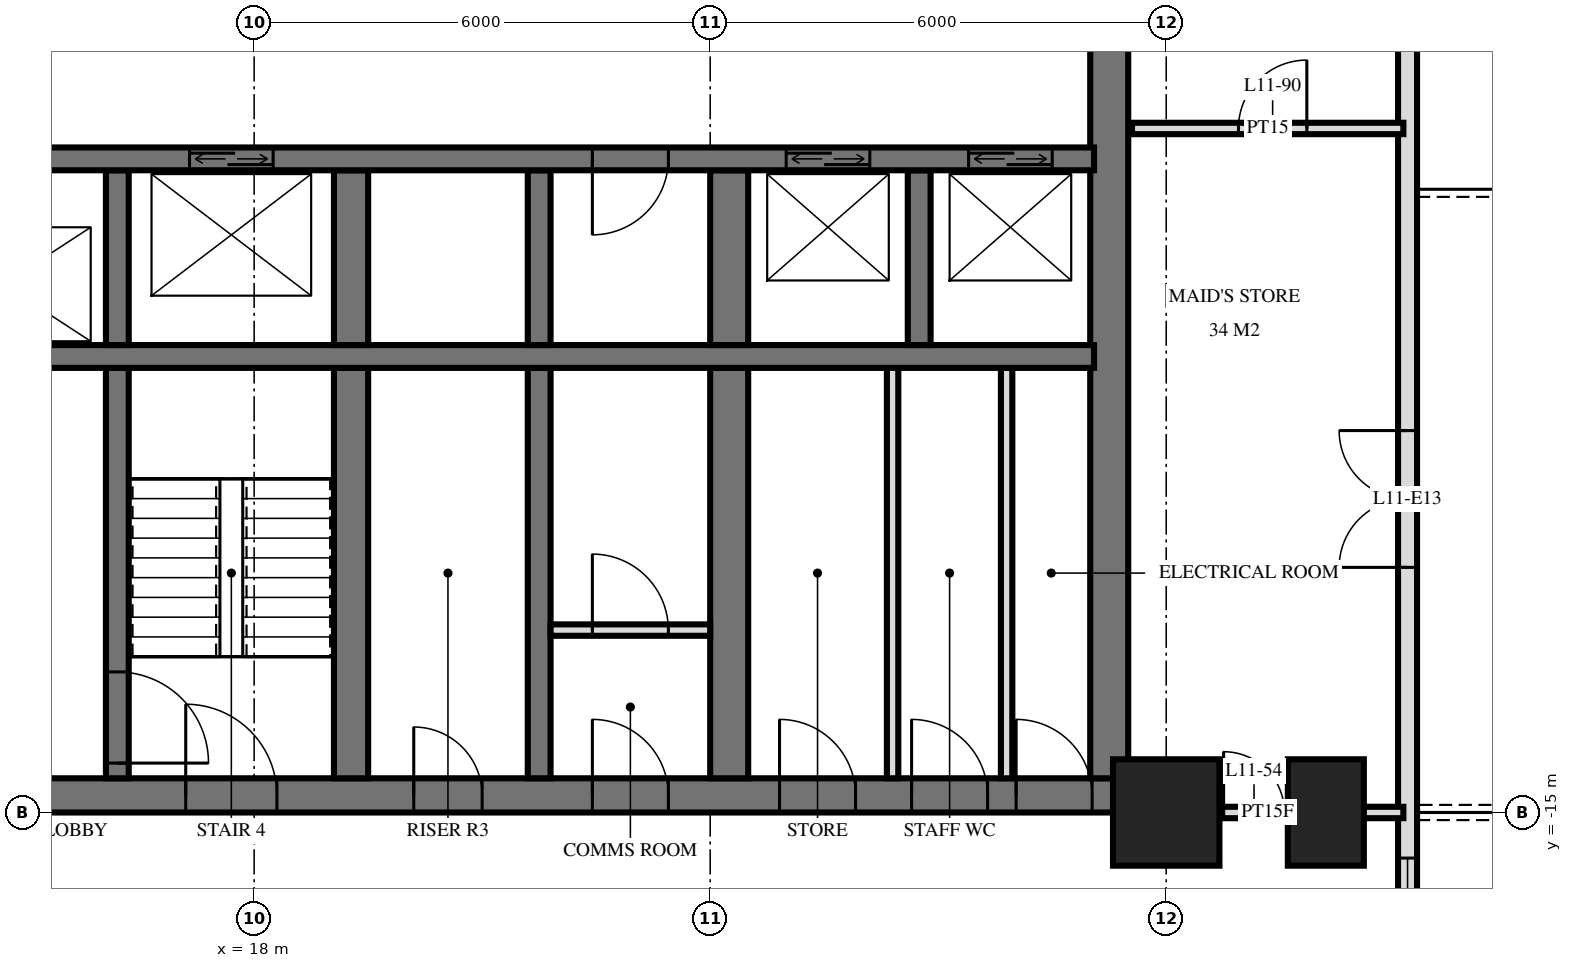
"""IFC4 building model, lengths in metres.
Left out: names, types, materials, properties, quantities, classifications, styles, units other than length and angle.
Written with IfcOpenShell. Run it as: python <this file> out.ifc"""

import sys

from ifc_helpers import new_model, si_unit, direction, frame, frame_2d, origin, origin_2d, place, context, subcontext, project, spatial, rectangle, extrude, element, fill, save


model = new_model("IFC4")
c1 = context("Model", 3, precision=1e-05, world=origin(), true_north=direction((0.0, 1.0)))
c2 = subcontext(c1, "Body", "Model", "MODEL_VIEW")
j1 = project(units=[si_unit("LENGTHUNIT", "METRE"), si_unit("PLANEANGLEUNIT", "RADIAN")], contexts=[c1])
p1 = place(None, origin())
s1 = spatial("IfcSite", under=j1, at=p1, CompositionType="ELEMENT")
p2 = place(p1, origin())
s2 = spatial("IfcBuilding", under=s1, at=p2, CompositionType="ELEMENT")
p3 = place(p2, frame((0.0, 0.0, 49.2)))
s3 = spatial("IfcBuildingStorey", under=s2, at=p3, CompositionType="ELEMENT", Elevation=49.2)
p4 = place(p3, frame((30.0, -15.0, 0.0), z_axis=(0.0, 0.0, 1.0), x_axis=(1.0, 0.0, 0.0)))
e1 = element("IfcColumn", 1, at=p4, inside=s3, PredefinedType="COLUMN", context=c2, shape_type="SweptSolid", body=[
    extrude(rectangle(XDim=1.4, YDim=1.4, at=origin_2d()), origin(), (0.0, 0.0, 1.0), 3.6),
])
p5 = place(p3, frame((32.1, -15.0, 0.0), z_axis=(0.0, 0.0, 1.0), x_axis=(0.0, 1.0, 0.0)))
e2 = element("IfcColumn", 2, at=p5, inside=s3, PredefinedType="COLUMN", context=c2, shape_type="SweptSolid", body=[
    extrude(rectangle(XDim=1.4, YDim=1.0, at=origin_2d()), origin(), (0.0, 0.0, 1.0), 3.6),
])
p6 = place(p3, frame((10.0, -14.775, 0.0), z_axis=(0.0, 0.0, 1.0), x_axis=(1.0, 0.0, 0.0)))
e3 = element("IfcWall", 3, at=p6, inside=s3, PredefinedType="SHEAR", context=c2, shape_type="SweptSolid", body=[
    extrude(rectangle(XDim=19.5, YDim=0.45, at=frame_2d((9.75, 0.0))), origin(), (0.0, 0.0, 1.0), 3.6),
])
p7 = place(p6, frame((7.1, 0.0, 0.0)))
e4 = element("IfcOpeningElement", 4, at=p7, cuts=e3, PredefinedType="OPENING", context=c2, shape_type="SweptSolid", body=[
    extrude(rectangle(XDim=1.2, YDim=2.1, at=frame_2d((0.6, 1.05))), frame((0.0, 0.235, 0.0), z_axis=(0.0, -1.0, 0.0), x_axis=(1.0, 0.0, 0.0)), (0.0, 0.0, 1.0), 0.47),
])
p8 = place(p6, frame((4.15, 0.0, 0.0)))
e5 = element("IfcOpeningElement", 5, at=p8, cuts=e3, PredefinedType="OPENING", context=c2, shape_type="SweptSolid", body=[
    extrude(rectangle(XDim=1.1, YDim=2.1, at=frame_2d((0.55, 1.05))), frame((0.0, 0.235, 0.0), z_axis=(0.0, -1.0, 0.0), x_axis=(1.0, 0.0, 0.0)), (0.0, 0.0, 1.0), 0.47),
])
p9 = place(p6, frame((10.1, 0.0, 0.0)))
e6 = element("IfcOpeningElement", 6, at=p9, cuts=e3, PredefinedType="OPENING", context=c2, shape_type="SweptSolid", body=[
    extrude(rectangle(XDim=0.9, YDim=2.1, at=frame_2d((0.45, 1.05))), frame((0.0, 0.235, 0.0), z_axis=(0.0, -1.0, 0.0), x_axis=(1.0, 0.0, 0.0)), (0.0, 0.0, 1.0), 0.47),
])
p10 = place(p6, frame((12.45, 0.0, 0.0)))
e7 = element("IfcOpeningElement", 7, at=p10, cuts=e3, PredefinedType="OPENING", context=c2, shape_type="SweptSolid", body=[
    extrude(rectangle(XDim=1.0, YDim=2.1, at=frame_2d((0.5, 1.05))), frame((0.0, 0.235, 0.0), z_axis=(0.0, -1.0, 0.0), x_axis=(1.0, 0.0, 0.0)), (0.0, 0.0, 1.0), 0.47),
])
p11 = place(p6, frame((14.913, 0.0, 0.0)))
e8 = element("IfcOpeningElement", 8, at=p11, cuts=e3, PredefinedType="OPENING", context=c2, shape_type="SweptSolid", body=[
    extrude(rectangle(XDim=1.0, YDim=2.1, at=frame_2d((0.5, 1.05))), frame((0.0, 0.235, 0.0), z_axis=(0.0, -1.0, 0.0), x_axis=(1.0, 0.0, 0.0)), (0.0, 0.0, 1.0), 0.47),
])
p12 = place(p6, frame((16.65, 0.0, 0.0)))
e9 = element("IfcOpeningElement", 9, at=p12, cuts=e3, PredefinedType="OPENING", context=c2, shape_type="SweptSolid", body=[
    extrude(rectangle(XDim=1.0, YDim=2.1, at=frame_2d((0.5, 1.05))), frame((0.0, 0.235, 0.0), z_axis=(0.0, -1.0, 0.0), x_axis=(1.0, 0.0, 0.0)), (0.0, 0.0, 1.0), 0.47),
])
p13 = place(p6, frame((18.025, 0.0, 0.0)))
e10 = element("IfcOpeningElement", 10, at=p13, cuts=e3, PredefinedType="OPENING", context=c2, shape_type="SweptSolid", body=[
    extrude(rectangle(XDim=1.0, YDim=2.1, at=frame_2d((0.5, 1.05))), frame((0.0, 0.235, 0.0), z_axis=(0.0, -1.0, 0.0), x_axis=(1.0, 0.0, 0.0)), (0.0, 0.0, 1.0), 0.47),
])
p14 = place(p3, frame((29.25, -14.55, 0.0), z_axis=(0.0, 0.0, 1.0), x_axis=(0.0, 1.0, 0.0)))
e11 = element("IfcWall", 11, at=p14, inside=s3, PredefinedType="SHEAR", context=c2, shape_type="SweptSolid", body=[
    extrude(rectangle(XDim=14.1, YDim=0.5, at=frame_2d((7.05, 0.0))), origin(), (0.0, 0.0, 1.0), 3.6),
])
p15 = place(p3, frame((10.35, -6.4, 0.0), z_axis=(0.0, 0.0, 1.0), x_axis=(1.0, 0.0, 0.0)))
e12 = element("IfcWall", 12, at=p15, inside=s3, PredefinedType="SHEAR", context=c2, shape_type="SweptSolid", body=[
    extrude(rectangle(XDim=18.7, YDim=0.3, at=frame_2d((9.35, 0.0))), origin(), (0.0, 0.0, 1.0), 3.6),
])
p16 = place(p15, frame((14.65, 0.0, 0.0)))
e13 = element("IfcOpeningElement", 13, at=p16, cuts=e12, PredefinedType="OPENING", context=c2, shape_type="SweptSolid", body=[
    extrude(rectangle(XDim=1.1, YDim=2.1, at=frame_2d((0.55, 1.05))), frame((0.0, 0.16, 0.0), z_axis=(0.0, -1.0, 0.0), x_axis=(1.0, 0.0, 0.0)), (0.0, 0.0, 1.0), 0.32),
])
p17 = place(p15, frame((17.05, 0.0, 0.0)))
e14 = element("IfcOpeningElement", 14, at=p17, cuts=e12, PredefinedType="OPENING", context=c2, shape_type="SweptSolid", body=[
    extrude(rectangle(XDim=1.1, YDim=2.1, at=frame_2d((0.55, 1.05))), frame((0.0, 0.16, 0.0), z_axis=(0.0, -1.0, 0.0), x_axis=(1.0, 0.0, 0.0)), (0.0, 0.0, 1.0), 0.32),
])
p18 = place(p15, frame((6.8, 0.0, 0.0)))
e15 = element("IfcOpeningElement", 15, at=p18, cuts=e12, PredefinedType="OPENING", context=c2, shape_type="SweptSolid", body=[
    extrude(rectangle(XDim=1.1, YDim=2.1, at=frame_2d((0.55, 1.05))), frame((0.0, 0.16, 0.0), z_axis=(0.0, -1.0, 0.0), x_axis=(1.0, 0.0, 0.0)), (0.0, 0.0, 1.0), 0.32),
])
p19 = place(p15, frame((12.1, 0.0, 0.0)))
e16 = element("IfcOpeningElement", 16, at=p19, cuts=e12, PredefinedType="OPENING", context=c2, shape_type="SweptSolid", body=[
    extrude(rectangle(XDim=1.0, YDim=2.1, at=frame_2d((0.5, 1.05))), frame((0.0, 0.16, 0.0), z_axis=(0.0, -1.0, 0.0), x_axis=(1.0, 0.0, 0.0)), (0.0, 0.0, 1.0), 0.32),
])
p20 = place(p3, frame((10.35, -9.0, 0.0), z_axis=(0.0, 0.0, 1.0), x_axis=(1.0, 0.0, 0.0)))
e17 = element("IfcWall", 17, at=p20, inside=s3, PredefinedType="SHEAR", context=c2, shape_type="SweptSolid", body=[
    extrude(rectangle(XDim=18.7, YDim=0.3, at=frame_2d((9.35, 0.0))), origin(), (0.0, 0.0, 1.0), 3.6),
])
p21 = place(p20, frame((3.8, 0.0, 0.0)))
e18 = element("IfcOpeningElement", 18, at=p21, cuts=e17, PredefinedType="OPENING", context=c2, shape_type="SweptSolid", body=[
    extrude(rectangle(XDim=1.1, YDim=2.1, at=frame_2d((0.55, 1.05))), frame((0.0, 0.16, 0.0), z_axis=(0.0, -1.0, 0.0), x_axis=(1.0, 0.0, 0.0)), (0.0, 0.0, 1.0), 0.32),
])
p22 = place(p3, frame((16.2, -8.85, 0.0), z_axis=(0.0, 0.0, 1.0), x_axis=(0.0, 1.0, 0.0)))
e19 = element("IfcWall", 19, at=p22, inside=s3, PredefinedType="SHEAR", context=c2, shape_type="SweptSolid", body=[
    extrude(rectangle(XDim=2.3, YDim=0.3, at=frame_2d((1.15, 0.0))), origin(), (0.0, 0.0, 1.0), 3.6),
])
p23 = place(p3, frame((16.2, -14.55, 0.0), z_axis=(0.0, 0.0, 1.0), x_axis=(0.0, 1.0, 0.0)))
e20 = element("IfcWall", 20, at=p23, inside=s3, PredefinedType="SHEAR", context=c2, shape_type="SweptSolid", body=[
    extrude(rectangle(XDim=5.4, YDim=0.3, at=frame_2d((2.7, 0.0))), origin(), (0.0, 0.0, 1.0), 3.6),
])
p24 = place(p23, frame((0.2, 0.0, 0.0)))
e21 = element("IfcOpeningElement", 21, at=p24, cuts=e20, PredefinedType="OPENING", context=c2, shape_type="SweptSolid", body=[
    extrude(rectangle(XDim=1.2, YDim=2.1, at=frame_2d((0.6, 1.05))), frame((0.0, 0.16, 0.0), z_axis=(0.0, -1.0, 0.0), x_axis=(1.0, 0.0, 0.0)), (0.0, 0.0, 1.0), 0.32),
])
p25 = place(p3, frame((19.275, -8.85, 0.0), z_axis=(0.0, 0.0, 1.0), x_axis=(0.0, 1.0, 0.0)))
e22 = element("IfcWall", 22, at=p25, inside=s3, PredefinedType="SHEAR", context=c2, shape_type="SweptSolid", body=[
    extrude(rectangle(XDim=2.3, YDim=0.45, at=frame_2d((1.15, 0.0))), origin(), (0.0, 0.0, 1.0), 3.6),
])
p26 = place(p3, frame((19.275, -14.55, 0.0), z_axis=(0.0, 0.0, 1.0), x_axis=(0.0, 1.0, 0.0)))
e23 = element("IfcWall", 23, at=p26, inside=s3, PredefinedType="SHEAR", context=c2, shape_type="SweptSolid", body=[
    extrude(rectangle(XDim=5.4, YDim=0.45, at=frame_2d((2.7, 0.0))), origin(), (0.0, 0.0, 1.0), 3.6),
])
p27 = place(p3, frame((21.75, -8.85, 0.0), z_axis=(0.0, 0.0, 1.0), x_axis=(0.0, 1.0, 0.0)))
e24 = element("IfcWall", 24, at=p27, inside=s3, PredefinedType="SHEAR", context=c2, shape_type="SweptSolid", body=[
    extrude(rectangle(XDim=2.3, YDim=0.3, at=frame_2d((1.15, 0.0))), origin(), (0.0, 0.0, 1.0), 3.6),
])
p28 = place(p3, frame((21.75, -14.55, 0.0), z_axis=(0.0, 0.0, 1.0), x_axis=(0.0, 1.0, 0.0)))
e25 = element("IfcWall", 25, at=p28, inside=s3, PredefinedType="SHEAR", context=c2, shape_type="SweptSolid", body=[
    extrude(rectangle(XDim=5.4, YDim=0.3, at=frame_2d((2.7, 0.0))), origin(), (0.0, 0.0, 1.0), 3.6),
])
p29 = place(p3, frame((24.25, -8.85, 0.0), z_axis=(0.0, 0.0, 1.0), x_axis=(0.0, 1.0, 0.0)))
e26 = element("IfcWall", 26, at=p29, inside=s3, PredefinedType="SHEAR", context=c2, shape_type="SweptSolid", body=[
    extrude(rectangle(XDim=2.3, YDim=0.5, at=frame_2d((1.15, 0.0))), origin(), (0.0, 0.0, 1.0), 3.6),
])
p30 = place(p3, frame((24.25, -14.55, 0.0), z_axis=(0.0, 0.0, 1.0), x_axis=(0.0, 1.0, 0.0)))
e27 = element("IfcWall", 27, at=p30, inside=s3, PredefinedType="SHEAR", context=c2, shape_type="SweptSolid", body=[
    extrude(rectangle(XDim=5.4, YDim=0.5, at=frame_2d((2.7, 0.0))), origin(), (0.0, 0.0, 1.0), 3.6),
])
p31 = place(p3, frame((26.75, -8.85, 0.0), z_axis=(0.0, 0.0, 1.0), x_axis=(0.0, 1.0, 0.0)))
e28 = element("IfcWall", 28, at=p31, inside=s3, PredefinedType="SHEAR", context=c2, shape_type="SweptSolid", body=[
    extrude(rectangle(XDim=2.3, YDim=0.3, at=frame_2d((1.15, 0.0))), origin(), (0.0, 0.0, 1.0), 3.6),
])
p32 = place(p3, frame((33.175, -24.875, 0.0), z_axis=(0.0, 0.0, 1.0), x_axis=(0.0, 1.0, 0.0)))
e29 = element("IfcWall", 29, at=p32, inside=s3, PredefinedType="SOLIDWALL", context=c2, shape_type="SweptSolid", body=[
    extrude(rectangle(XDim=21.551, YDim=0.25, at=frame_2d((10.775, 0.0))), origin(), (0.0, 0.0, 1.0), 3.32),
])
p33 = place(p32, frame((0.575, 0.0, 0.0)))
e30 = element("IfcOpeningElement", 30, at=p33, cuts=e29, PredefinedType="OPENING", context=c2, shape_type="SweptSolid", body=[
    extrude(rectangle(XDim=1.8, YDim=2.4, at=frame_2d((0.9, 1.2))), frame((0.0, 0.135, 0.0), z_axis=(0.0, -1.0, 0.0), x_axis=(1.0, 0.0, 0.0)), (0.0, 0.0, 1.0), 0.27),
])
p34 = place(p32, frame((5.075, 0.0, 0.0)))
e31 = element("IfcOpeningElement", 31, at=p34, cuts=e29, PredefinedType="OPENING", context=c2, shape_type="SweptSolid", body=[
    extrude(rectangle(XDim=1.8, YDim=2.4, at=frame_2d((0.9, 1.2))), frame((0.0, 0.135, 0.0), z_axis=(0.0, -1.0, 0.0), x_axis=(1.0, 0.0, 0.0)), (0.0, 0.0, 1.0), 0.27),
])
p35 = place(p32, frame((8.075, 0.0, 0.3)))
e32 = element("IfcOpeningElement", 32, at=p35, cuts=e29, PredefinedType="OPENING", context=c2, shape_type="SweptSolid", body=[
    extrude(rectangle(XDim=1.2, YDim=2.1, at=frame_2d((0.6, 1.05))), frame((0.0, 0.135, 0.0), z_axis=(0.0, -1.0, 0.0), x_axis=(1.0, 0.0, 0.0)), (0.0, 0.0, 1.0), 0.27),
])
p36 = place(p32, frame((13.1, 0.0, 0.0)))
e33 = element("IfcOpeningElement", 33, at=p36, cuts=e29, PredefinedType="OPENING", context=c2, shape_type="SweptSolid", body=[
    extrude(rectangle(XDim=1.8, YDim=2.4, at=frame_2d((0.9, 1.2))), frame((0.0, 0.135, 0.0), z_axis=(0.0, -1.0, 0.0), x_axis=(1.0, 0.0, 0.0)), (0.0, 0.0, 1.0), 0.27),
])
p37 = place(p3, frame((21.9, -12.6, 0.0), z_axis=(0.0, 0.0, 1.0), x_axis=(1.0, 0.0, 0.0)))
e34 = element("IfcWall", 34, at=p37, inside=s3, PredefinedType="PARTITIONING", context=c2, shape_type="SweptSolid", body=[
    extrude(rectangle(XDim=2.1, YDim=0.15, at=frame_2d((1.05, 0.0))), origin(), (0.0, 0.0, 1.0), 3.3),
])
p38 = place(p37, frame((0.55, 0.0, 0.0)))
e35 = element("IfcOpeningElement", 35, at=p38, cuts=e34, PredefinedType="OPENING", context=c2, shape_type="SweptSolid", body=[
    extrude(rectangle(XDim=1.0, YDim=2.1, at=frame_2d((0.5, 1.05))), frame((0.0, 0.085, 0.0), z_axis=(0.0, -1.0, 0.0), x_axis=(1.0, 0.0, 0.0)), (0.0, 0.0, 1.0), 0.17),
])
for number, where, z_axis, x_axis in (
    (36, (26.4, -14.55, 0.0), (0.0, 0.0, 1.0), (0.0, 1.0, 0.0)),
    (37, (27.9, -14.55, 0.0), (0.0, 0.0, 1.0), (0.0, 1.0, 0.0)),
):
    element("IfcWall", number, at=place(p3, frame(where, z_axis=z_axis, x_axis=x_axis)), inside=s3, PredefinedType="PARTITIONING", context=c2, shape_type="SweptSolid", body=[
        extrude(rectangle(XDim=5.4, YDim=0.15, at=frame_2d((2.7, 0.0))), origin(), (0.0, 0.0, 1.0), 3.3),
    ])
p39 = place(p3, frame((29.55, -15.0, 0.0), z_axis=(0.0, 0.0, 1.0), x_axis=(1.0, 0.0, 0.0)))
e38 = element("IfcWall", 38, at=p39, inside=s3, PredefinedType="PARTITIONING", context=c2, shape_type="SweptSolid", body=[
    extrude(rectangle(XDim=3.57, YDim=0.15, at=frame_2d((1.785, 0.0))), origin(), (0.0, 0.0, 1.0), 3.32),
])
p40 = place(p39, frame((1.205, 0.0, 0.0)))
e39 = element("IfcOpeningElement", 39, at=p40, cuts=e38, PredefinedType="OPENING", context=c2, shape_type="SweptSolid", body=[
    extrude(rectangle(XDim=0.8, YDim=2.1, at=frame_2d((0.4, 1.05))), frame((0.0, 0.085, 0.0), z_axis=(0.0, -1.0, 0.0), x_axis=(1.0, 0.0, 0.0)), (0.0, 0.0, 1.0), 0.17),
])
p41 = place(p3, frame((29.55, -6.0, 0.0), z_axis=(0.0, 0.0, 1.0), x_axis=(1.0, 0.0, 0.0)))
e40 = element("IfcWall", 40, at=p41, inside=s3, PredefinedType="PARTITIONING", context=c2, shape_type="SweptSolid", body=[
    extrude(rectangle(XDim=3.57, YDim=0.15, at=frame_2d((1.785, 0.0))), origin(), (0.0, 0.0, 1.0), 3.32),
])
p42 = place(p41, frame((1.4, 0.0, 0.0)))
e41 = element("IfcOpeningElement", 41, at=p42, cuts=e40, PredefinedType="OPENING", context=c2, shape_type="SweptSolid", body=[
    extrude(rectangle(XDim=0.9, YDim=2.1, at=frame_2d((0.45, 1.05))), frame((0.0, 0.085, 0.0), z_axis=(0.0, -1.0, 0.0), x_axis=(1.0, 0.0, 0.0)), (0.0, 0.0, 1.0), 0.17),
])
p43 = place(p35, origin())
e42 = element("IfcWindow", 42, at=p43, inside=s3, PartitioningType="SINGLE_PANEL", PredefinedType="WINDOW", context=c2, shape_type="SweptSolid", body=[
    extrude(rectangle(XDim=1.2, YDim=2.1, at=frame_2d((0.6, 1.05))), frame((0.0, 0.03, 0.0), z_axis=(0.0, -1.0, 0.0), x_axis=(1.0, 0.0, 0.0)), (0.0, 0.0, 1.0), 0.06),
])
fill(e32, e42)
p44 = place(p36, origin())
e43 = element("IfcDoor", 43, at=p44, inside=s3, OperationType="DOUBLE_DOOR_SINGLE_SWING", PredefinedType="DOOR", context=c2, shape_type="SweptSolid", body=[
    extrude(rectangle(XDim=1.8, YDim=2.4, at=frame_2d((0.9, 1.2))), frame((0.0, 0.025, 0.0), z_axis=(0.0, -1.0, 0.0), x_axis=(1.0, 0.0, 0.0)), (0.0, 0.0, 1.0), 0.05),
])
fill(e33, e43)
p45 = place(p16, origin())
e44 = element("IfcDoor", 44, at=p45, inside=s3, OperationType="DOUBLE_DOOR_SLIDING", PredefinedType="USERDEFINED", context=c2, shape_type="SweptSolid", body=[
    extrude(rectangle(XDim=1.1, YDim=2.1, at=frame_2d((0.55, 1.05))), frame((0.0, 0.025, 0.0), z_axis=(0.0, -1.0, 0.0), x_axis=(1.0, 0.0, 0.0)), (0.0, 0.0, 1.0), 0.05),
])
fill(e13, e44)
p46 = place(p17, origin())
e45 = element("IfcDoor", 45, at=p46, inside=s3, OperationType="DOUBLE_DOOR_SLIDING", PredefinedType="USERDEFINED", context=c2, shape_type="SweptSolid", body=[
    extrude(rectangle(XDim=1.1, YDim=2.1, at=frame_2d((0.55, 1.05))), frame((0.0, 0.025, 0.0), z_axis=(0.0, -1.0, 0.0), x_axis=(1.0, 0.0, 0.0)), (0.0, 0.0, 1.0), 0.05),
])
fill(e14, e45)
p47 = place(p18, origin())
e46 = element("IfcDoor", 46, at=p47, inside=s3, OperationType="DOUBLE_DOOR_SLIDING", PredefinedType="USERDEFINED", context=c2, shape_type="SweptSolid", body=[
    extrude(rectangle(XDim=1.1, YDim=2.1, at=frame_2d((0.55, 1.05))), frame((0.0, 0.025, 0.0), z_axis=(0.0, -1.0, 0.0), x_axis=(1.0, 0.0, 0.0)), (0.0, 0.0, 1.0), 0.05),
])
fill(e15, e46)
p48 = place(p7, origin())
e47 = element("IfcDoor", 47, at=p48, inside=s3, OperationType="SINGLE_SWING_RIGHT", PredefinedType="DOOR", context=c2, shape_type="SweptSolid", body=[
    extrude(rectangle(XDim=1.2, YDim=2.1, at=frame_2d((0.6, 1.05))), frame((0.0, 0.025, 0.0), z_axis=(0.0, -1.0, 0.0), x_axis=(1.0, 0.0, 0.0)), (0.0, 0.0, 1.0), 0.05),
])
fill(e4, e47)
p49 = place(p9, origin())
e48 = element("IfcDoor", 48, at=p49, inside=s3, OperationType="SINGLE_SWING_RIGHT", PredefinedType="DOOR", context=c2, shape_type="SweptSolid", body=[
    extrude(rectangle(XDim=0.9, YDim=2.1, at=frame_2d((0.45, 1.05))), frame((0.0, 0.025, 0.0), z_axis=(0.0, -1.0, 0.0), x_axis=(1.0, 0.0, 0.0)), (0.0, 0.0, 1.0), 0.05),
])
fill(e6, e48)
p50 = place(p10, origin())
e49 = element("IfcDoor", 49, at=p50, inside=s3, OperationType="SINGLE_SWING_RIGHT", PredefinedType="DOOR", context=c2, shape_type="SweptSolid", body=[
    extrude(rectangle(XDim=1.0, YDim=2.1, at=frame_2d((0.5, 1.05))), frame((0.0, 0.025, 0.0), z_axis=(0.0, -1.0, 0.0), x_axis=(1.0, 0.0, 0.0)), (0.0, 0.0, 1.0), 0.05),
])
fill(e7, e49)
p51 = place(p11, origin())
e50 = element("IfcDoor", 50, at=p51, inside=s3, OperationType="SINGLE_SWING_RIGHT", PredefinedType="DOOR", context=c2, shape_type="SweptSolid", body=[
    extrude(rectangle(XDim=1.0, YDim=2.1, at=frame_2d((0.5, 1.05))), frame((0.0, 0.025, 0.0), z_axis=(0.0, -1.0, 0.0), x_axis=(1.0, 0.0, 0.0)), (0.0, 0.0, 1.0), 0.05),
])
fill(e8, e50)
p52 = place(p12, origin())
e51 = element("IfcDoor", 51, at=p52, inside=s3, OperationType="SINGLE_SWING_RIGHT", PredefinedType="DOOR", context=c2, shape_type="SweptSolid", body=[
    extrude(rectangle(XDim=1.0, YDim=2.1, at=frame_2d((0.5, 1.05))), frame((0.0, 0.025, 0.0), z_axis=(0.0, -1.0, 0.0), x_axis=(1.0, 0.0, 0.0)), (0.0, 0.0, 1.0), 0.05),
])
fill(e9, e51)
p53 = place(p13, origin())
e52 = element("IfcDoor", 52, at=p53, inside=s3, OperationType="SINGLE_SWING_RIGHT", PredefinedType="DOOR", context=c2, shape_type="SweptSolid", body=[
    extrude(rectangle(XDim=1.0, YDim=2.1, at=frame_2d((0.5, 1.05))), frame((0.0, 0.025, 0.0), z_axis=(0.0, -1.0, 0.0), x_axis=(1.0, 0.0, 0.0)), (0.0, 0.0, 1.0), 0.05),
])
fill(e10, e52)
p54 = place(p19, frame((0.5, 0.0, 0.0), z_axis=(0.0, 0.0, 1.0), x_axis=(-1.0, 0.0, 0.0)))
e53 = element("IfcDoor", 53, at=p54, inside=s3, OperationType="SINGLE_SWING_LEFT", PredefinedType="DOOR", context=c2, shape_type="SweptSolid", body=[
    extrude(rectangle(XDim=1.0, YDim=2.1, at=frame_2d((0.0, 1.05))), frame((0.0, -0.025, 0.0), z_axis=(0.0, 1.0, 0.0), x_axis=(-1.0, 0.0, 0.0)), (0.0, 0.0, 1.0), 0.05),
])
fill(e16, e53)
p55 = place(p24, frame((0.6, 0.0, 0.0), z_axis=(0.0, 0.0, 1.0), x_axis=(-1.0, 0.0, 0.0)))
e54 = element("IfcDoor", 54, at=p55, inside=s3, OperationType="SINGLE_SWING_LEFT", PredefinedType="DOOR", context=c2, shape_type="SweptSolid", body=[
    extrude(rectangle(XDim=1.2, YDim=2.1, at=frame_2d((0.0, 1.05))), frame((0.0, -0.025, 0.0), z_axis=(0.0, 1.0, 0.0), x_axis=(-1.0, 0.0, 0.0)), (0.0, 0.0, 1.0), 0.05),
])
fill(e21, e54)
p56 = place(p38, origin())
e55 = element("IfcDoor", 55, at=p56, inside=s3, OperationType="SINGLE_SWING_RIGHT", PredefinedType="DOOR", context=c2, shape_type="SweptSolid", body=[
    extrude(rectangle(XDim=1.0, YDim=2.1, at=frame_2d((0.5, 1.05))), frame((0.0, 0.025, 0.0), z_axis=(0.0, -1.0, 0.0), x_axis=(1.0, 0.0, 0.0)), (0.0, 0.0, 1.0), 0.05),
])
fill(e35, e55)
p57 = place(p40, origin())
e56 = element("IfcDoor", 56, at=p57, inside=s3, OperationType="SINGLE_SWING_RIGHT", PredefinedType="DOOR", context=c2, shape_type="SweptSolid", body=[
    extrude(rectangle(XDim=0.8, YDim=2.1, at=frame_2d((0.4, 1.05))), frame((0.0, 0.025, 0.0), z_axis=(0.0, -1.0, 0.0), x_axis=(1.0, 0.0, 0.0)), (0.0, 0.0, 1.0), 0.05),
])
fill(e39, e56)
p58 = place(p42, origin())
e57 = element("IfcDoor", 57, at=p58, inside=s3, OperationType="SINGLE_SWING_LEFT", PredefinedType="DOOR", context=c2, shape_type="SweptSolid", body=[
    extrude(rectangle(XDim=0.9, YDim=2.1, at=frame_2d((0.45, 1.05))), frame((0.0, 0.025, 0.0), z_axis=(0.0, -1.0, 0.0), x_axis=(1.0, 0.0, 0.0)), (0.0, 0.0, 1.0), 0.05),
])
fill(e41, e57)
save(model, sys.argv[1])
